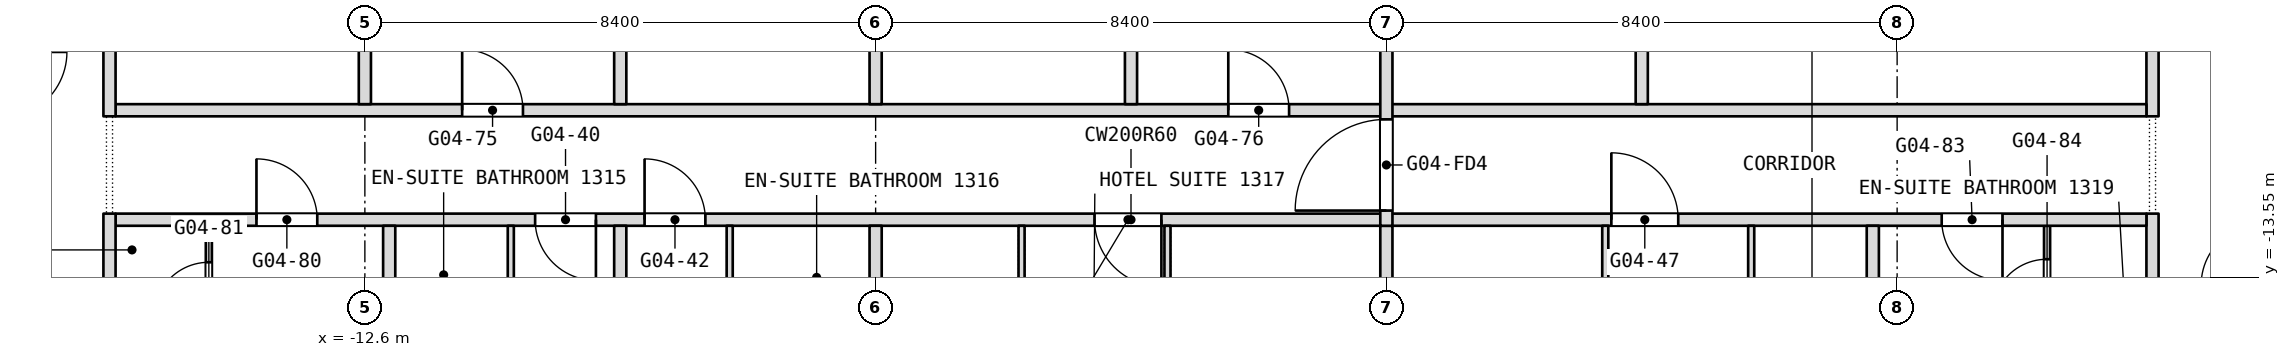
"""IFC4 building model, lengths in metres.
Left out: names, types, materials, properties, quantities, classifications, styles, units other than length and angle.
Written with IfcOpenShell. Run it as: python <this file> out.ifc"""

import sys

from ifc_helpers import new_model, si_unit, direction, frame, frame_2d, origin, place, context, subcontext, project, spatial, rectangle, extrude, element, fill, save


model = new_model("IFC4")
c1 = context("Model", 3, precision=1e-05, world=origin(), true_north=direction((0.0, 1.0)))
c2 = subcontext(c1, "Body", "Model", "MODEL_VIEW")
j1 = project(units=[si_unit("LENGTHUNIT", "METRE"), si_unit("PLANEANGLEUNIT", "RADIAN")], contexts=[c1])
p1 = place(None, origin())
s1 = spatial("IfcSite", under=j1, at=p1, CompositionType="ELEMENT")
p2 = place(p1, origin())
s2 = spatial("IfcBuilding", under=s1, at=p2, CompositionType="ELEMENT")
p3 = place(p2, frame((0.0, 0.0, 61.7)))
s3 = spatial("IfcBuildingStorey", under=s2, at=p3, CompositionType="ELEMENT", Elevation=61.7)
p4 = place(p3, frame((16.8, -17.143, 0.0), z_axis=(0.0, 0.0, 1.0), x_axis=(0.0, 1.0, 0.0)))
e1 = element("IfcWall", 1, at=p4, inside=s3, PredefinedType="PARTITIONING", context=c2, shape_type="SweptSolid", body=[
    extrude(rectangle(XDim=4.643, YDim=0.2, at=frame_2d((2.322, 0.0))), origin(), (0.0, 0.0, 1.0), 3.34),
])
p5 = place(p4, frame((0.771, 0.0, 0.0)))
e2 = element("IfcOpeningElement", 2, at=p5, cuts=e1, PredefinedType="OPENING", context=c2, shape_type="SweptSolid", body=[
    extrude(rectangle(XDim=0.9, YDim=2.1, at=frame_2d((0.45, 1.05))), frame((0.0, 0.1, 0.0), z_axis=(0.0, -1.0, 0.0), x_axis=(1.0, 0.0, 0.0)), (0.0, 0.0, 1.0), 0.2),
])
p6 = place(p3, frame((16.8, -10.9, 0.0), z_axis=(0.0, 0.0, 1.0), x_axis=(0.0, 1.0, 0.0)))
e3 = element("IfcWall", 3, at=p6, inside=s3, PredefinedType="PARTITIONING", context=c2, shape_type="SweptSolid", body=[
    extrude(rectangle(XDim=7.3, YDim=0.2, at=frame_2d((3.65, 0.0))), origin(), (0.0, 0.0, 1.0), 3.34),
])
p7 = place(p6, frame((3.15, 0.0, 0.0)))
e4 = element("IfcOpeningElement", 4, at=p7, cuts=e3, PredefinedType="OPENING", context=c2, shape_type="SweptSolid", body=[
    extrude(rectangle(XDim=1.0, YDim=2.1, at=frame_2d((0.5, 1.05))), frame((0.0, 0.1, 0.0), z_axis=(0.0, -1.0, 0.0), x_axis=(1.0, 0.0, 0.0)), (0.0, 0.0, 1.0), 0.2),
])
p8 = place(p3, frame((15.066, -14.9, 0.0), z_axis=(0.0, 0.0, 1.0), x_axis=(0.0, 1.0, 0.0)))
e5 = element("IfcWall", 5, at=p8, inside=s3, PredefinedType="PARTITIONING", context=c2, shape_type="SweptSolid", body=[
    extrude(rectangle(XDim=2.2, YDim=0.1, at=frame_2d((1.1, 0.0))), origin(), (0.0, 0.0, 1.0), 3.34),
])
p9 = place(p8, frame((0.75, 0.0, 0.0)))
e6 = element("IfcOpeningElement", 6, at=p9, cuts=e5, PredefinedType="OPENING", context=c2, shape_type="SweptSolid", body=[
    extrude(rectangle(XDim=0.9, YDim=2.1, at=frame_2d((0.45, 1.05))), frame((0.0, 0.05, 0.0), z_axis=(0.0, -1.0, 0.0), x_axis=(1.0, 0.0, 0.0)), (0.0, 0.0, 1.0), 0.1),
])
p10 = place(p3, frame((-16.7, -12.6, 0.0), z_axis=(0.0, 0.0, 1.0), x_axis=(1.0, 0.0, 0.0)))
e7 = element("IfcWall", 7, at=p10, inside=s3, PredefinedType="PARTITIONING", context=c2, shape_type="SweptSolid", body=[
    extrude(rectangle(XDim=33.4, YDim=0.2, at=frame_2d((16.7, 0.0))), origin(), (0.0, 0.0, 1.0), 3.34),
])
p11 = place(p10, frame((6.9, 0.0, 0.0)))
e8 = element("IfcOpeningElement", 8, at=p11, cuts=e7, PredefinedType="OPENING", context=c2, shape_type="SweptSolid", body=[
    extrude(rectangle(XDim=1.0, YDim=2.1, at=frame_2d((0.5, 1.05))), frame((0.0, 0.1, 0.0), z_axis=(0.0, -1.0, 0.0), x_axis=(1.0, 0.0, 0.0)), (0.0, 0.0, 1.0), 0.2),
])
p12 = place(p10, frame((8.7, 0.0, 0.0)))
e9 = element("IfcOpeningElement", 9, at=p12, cuts=e7, PredefinedType="OPENING", context=c2, shape_type="SweptSolid", body=[
    extrude(rectangle(XDim=1.0, YDim=2.1, at=frame_2d((0.5, 1.05))), frame((0.0, 0.1, 0.0), z_axis=(0.0, -1.0, 0.0), x_axis=(1.0, 0.0, 0.0)), (0.0, 0.0, 1.0), 0.2),
])
p13 = place(p10, frame((16.1, 0.0, 0.0)))
e10 = element("IfcOpeningElement", 10, at=p13, cuts=e7, PredefinedType="OPENING", context=c2, shape_type="SweptSolid", body=[
    extrude(rectangle(XDim=1.1, YDim=2.1, at=frame_2d((0.55, 1.05))), frame((0.0, 0.1, 0.0), z_axis=(0.0, -1.0, 0.0), x_axis=(1.0, 0.0, 0.0)), (0.0, 0.0, 1.0), 0.2),
])
p14 = place(p10, frame((24.6, 0.0, 0.0)))
e11 = element("IfcOpeningElement", 11, at=p14, cuts=e7, PredefinedType="OPENING", context=c2, shape_type="SweptSolid", body=[
    extrude(rectangle(XDim=1.1, YDim=2.1, at=frame_2d((0.55, 1.05))), frame((0.0, 0.1, 0.0), z_axis=(0.0, -1.0, 0.0), x_axis=(1.0, 0.0, 0.0)), (0.0, 0.0, 1.0), 0.2),
])
p15 = place(p10, frame((2.317, 0.0, 0.0)))
e12 = element("IfcOpeningElement", 12, at=p15, cuts=e7, PredefinedType="OPENING", context=c2, shape_type="SweptSolid", body=[
    extrude(rectangle(XDim=1.0, YDim=2.1, at=frame_2d((0.5, 1.05))), frame((0.0, 0.1, 0.0), z_axis=(0.0, -1.0, 0.0), x_axis=(1.0, 0.0, 0.0)), (0.0, 0.0, 1.0), 0.2),
])
p16 = place(p10, frame((30.033, 0.0, 0.0)))
e13 = element("IfcOpeningElement", 13, at=p16, cuts=e7, PredefinedType="OPENING", context=c2, shape_type="SweptSolid", body=[
    extrude(rectangle(XDim=1.0, YDim=2.1, at=frame_2d((0.5, 1.05))), frame((0.0, 0.1, 0.0), z_axis=(0.0, -1.0, 0.0), x_axis=(1.0, 0.0, 0.0)), (0.0, 0.0, 1.0), 0.2),
])
p17 = place(p3, frame((12.2, -15.8, 0.0), z_axis=(0.0, 0.0, 1.0), x_axis=(0.0, 1.0, 0.0)))
e14 = element("IfcWall", 14, at=p17, inside=s3, PredefinedType="PARTITIONING", context=c2, shape_type="SweptSolid", body=[
    extrude(rectangle(XDim=3.1, YDim=0.2, at=frame_2d((1.55, 0.0))), origin(), (0.0, 0.0, 1.0), 3.34),
])
p18 = place(p3, frame((-16.7, -10.8, 0.0), z_axis=(0.0, 0.0, 1.0), x_axis=(1.0, 0.0, 0.0)))
e15 = element("IfcWall", 15, at=p18, inside=s3, PredefinedType="PARTITIONING", context=c2, shape_type="SweptSolid", body=[
    extrude(rectangle(XDim=33.4, YDim=0.2, at=frame_2d((16.7, 0.0))), origin(), (0.0, 0.0, 1.0), 3.34),
])
p19 = place(p18, frame((5.7, 0.0, 0.0)))
e16 = element("IfcOpeningElement", 16, at=p19, cuts=e15, PredefinedType="OPENING", context=c2, shape_type="SweptSolid", body=[
    extrude(rectangle(XDim=1.0, YDim=2.1, at=frame_2d((0.5, 1.05))), frame((0.0, 0.1, 0.0), z_axis=(0.0, -1.0, 0.0), x_axis=(1.0, 0.0, 0.0)), (0.0, 0.0, 1.0), 0.2),
])
p20 = place(p18, frame((18.3, 0.0, 0.0)))
e17 = element("IfcOpeningElement", 17, at=p20, cuts=e15, PredefinedType="OPENING", context=c2, shape_type="SweptSolid", body=[
    extrude(rectangle(XDim=1.0, YDim=2.1, at=frame_2d((0.5, 1.05))), frame((0.0, 0.1, 0.0), z_axis=(0.0, -1.0, 0.0), x_axis=(1.0, 0.0, 0.0)), (0.0, 0.0, 1.0), 0.2),
])
p21 = place(p3, frame((10.2, -16.25, 0.0), z_axis=(0.0, 0.0, 1.0), x_axis=(0.0, 1.0, 0.0)))
e18 = element("IfcWall", 18, at=p21, inside=s3, PredefinedType="PARTITIONING", context=c2, shape_type="SweptSolid", body=[
    extrude(rectangle(XDim=3.55, YDim=0.1, at=frame_2d((1.775, 0.0))), origin(), (0.0, 0.0, 1.0), 3.34),
])
p22 = place(p3, frame((8.4, -10.7, 0.0), z_axis=(0.0, 0.0, 1.0), x_axis=(0.0, 1.0, 0.0)))
e19 = element("IfcWall", 19, at=p22, inside=s3, PredefinedType="PARTITIONING", context=c2, shape_type="SweptSolid", body=[
    extrude(rectangle(XDim=3.6, YDim=0.2, at=frame_2d((1.8, 0.0))), origin(), (0.0, 0.0, 1.0), 3.34),
])
p23 = place(p3, frame((7.8, -16.15, 0.0), z_axis=(0.0, 0.0, 1.0), x_axis=(0.0, 1.0, 0.0)))
e20 = element("IfcWall", 20, at=p23, inside=s3, PredefinedType="PARTITIONING", context=c2, shape_type="SweptSolid", body=[
    extrude(rectangle(XDim=3.45, YDim=0.1, at=frame_2d((1.725, 0.0))), origin(), (0.0, 0.0, 1.0), 3.34),
])
p24 = place(p3, frame((4.2, -17.7, 0.0), z_axis=(0.0, 0.0, 1.0), x_axis=(0.0, 1.0, 0.0)))
e21 = element("IfcWall", 21, at=p24, inside=s3, PredefinedType="PARTITIONING", context=c2, shape_type="SweptSolid", body=[
    extrude(rectangle(XDim=5.0, YDim=0.2, at=frame_2d((2.5, 0.0))), origin(), (0.0, 0.0, 1.0), 3.34),
])
p25 = place(p3, frame((4.2, -12.7, 0.0), z_axis=(0.0, 0.0, 1.0), x_axis=(0.0, 1.0, 0.0)))
e22 = element("IfcWall", 22, at=p25, inside=s3, PredefinedType="PARTITIONING", context=c2, shape_type="SweptSolid", body=[
    extrude(rectangle(XDim=12.7, YDim=0.2, at=frame_2d((6.35, 0.0))), origin(), (0.0, 0.0, 1.0), 3.34),
])
p26 = place(p25, frame((11.05, 0.0, 0.0)))
e23 = element("IfcOpeningElement", 23, at=p26, cuts=e22, PredefinedType="OPENING", context=c2, shape_type="SweptSolid", body=[
    extrude(rectangle(XDim=1.5, YDim=2.1, at=frame_2d((0.75, 1.05))), frame((0.0, 0.1, 0.0), z_axis=(0.0, -1.0, 0.0), x_axis=(1.0, 0.0, 0.0)), (0.0, 0.0, 1.0), 0.2),
])
p27 = place(p25, frame((0.25, 0.0, 0.0)))
e24 = element("IfcOpeningElement", 24, at=p27, cuts=e22, PredefinedType="OPENING", context=c2, shape_type="SweptSolid", body=[
    extrude(rectangle(XDim=1.5, YDim=2.1, at=frame_2d((0.75, 1.05))), frame((0.0, 0.1, 0.0), z_axis=(0.0, -1.0, 0.0), x_axis=(1.0, 0.0, 0.0)), (0.0, 0.0, 1.0), 0.2),
])
p28 = place(p3, frame((0.6, -16.25, 0.0), z_axis=(0.0, 0.0, 1.0), x_axis=(0.0, 1.0, 0.0)))
e25 = element("IfcWall", 25, at=p28, inside=s3, PredefinedType="PARTITIONING", context=c2, shape_type="SweptSolid", body=[
    extrude(rectangle(XDim=3.55, YDim=0.1, at=frame_2d((1.775, 0.0))), origin(), (0.0, 0.0, 1.0), 3.34),
])
p29 = place(p3, frame((0.0, -10.7, 0.0), z_axis=(0.0, 0.0, 1.0), x_axis=(0.0, 1.0, 0.0)))
e26 = element("IfcWall", 26, at=p29, inside=s3, PredefinedType="PARTITIONING", context=c2, shape_type="SweptSolid", body=[
    extrude(rectangle(XDim=8.8, YDim=0.2, at=frame_2d((4.4, 0.0))), origin(), (0.0, 0.0, 1.0), 3.34),
])
p30 = place(p3, frame((-1.8, -16.15, 0.0), z_axis=(0.0, 0.0, 1.0), x_axis=(0.0, 1.0, 0.0)))
e27 = element("IfcWall", 27, at=p30, inside=s3, PredefinedType="PARTITIONING", context=c2, shape_type="SweptSolid", body=[
    extrude(rectangle(XDim=3.45, YDim=0.1, at=frame_2d((1.725, 0.0))), origin(), (0.0, 0.0, 1.0), 3.34),
])
p31 = place(p3, frame((-4.2, -17.7, 0.0), z_axis=(0.0, 0.0, 1.0), x_axis=(0.0, 1.0, 0.0)))
e28 = element("IfcWall", 28, at=p31, inside=s3, PredefinedType="PARTITIONING", context=c2, shape_type="SweptSolid", body=[
    extrude(rectangle(XDim=5.0, YDim=0.2, at=frame_2d((2.5, 0.0))), origin(), (0.0, 0.0, 1.0), 3.34),
])
p32 = place(p3, frame((-4.2, -10.7, 0.0), z_axis=(0.0, 0.0, 1.0), x_axis=(0.0, 1.0, 0.0)))
e29 = element("IfcWall", 29, at=p32, inside=s3, PredefinedType="PARTITIONING", context=c2, shape_type="SweptSolid", body=[
    extrude(rectangle(XDim=8.8, YDim=0.2, at=frame_2d((4.4, 0.0))), origin(), (0.0, 0.0, 1.0), 3.34),
])
p33 = place(p3, frame((-6.6, -15.425, 0.0), z_axis=(0.0, 0.0, 1.0), x_axis=(0.0, 1.0, 0.0)))
e30 = element("IfcWall", 30, at=p33, inside=s3, PredefinedType="PARTITIONING", context=c2, shape_type="SweptSolid", body=[
    extrude(rectangle(XDim=2.725, YDim=0.1, at=frame_2d((1.363, 0.0))), origin(), (0.0, 0.0, 1.0), 3.34),
])
p34 = place(p3, frame((-8.4, -17.7, 0.0), z_axis=(0.0, 0.0, 1.0), x_axis=(0.0, 1.0, 0.0)))
e31 = element("IfcWall", 31, at=p34, inside=s3, PredefinedType="PARTITIONING", context=c2, shape_type="SweptSolid", body=[
    extrude(rectangle(XDim=5.0, YDim=0.2, at=frame_2d((2.5, 0.0))), origin(), (0.0, 0.0, 1.0), 3.34),
])
p35 = place(p3, frame((-8.4, -10.7, 0.0), z_axis=(0.0, 0.0, 1.0), x_axis=(0.0, 1.0, 0.0)))
e32 = element("IfcWall", 32, at=p35, inside=s3, PredefinedType="PARTITIONING", context=c2, shape_type="SweptSolid", body=[
    extrude(rectangle(XDim=5.4, YDim=0.2, at=frame_2d((2.7, 0.0))), origin(), (0.0, 0.0, 1.0), 3.34),
])
p36 = place(p3, frame((-10.2, -15.325, 0.0), z_axis=(0.0, 0.0, 1.0), x_axis=(0.0, 1.0, 0.0)))
e33 = element("IfcWall", 33, at=p36, inside=s3, PredefinedType="PARTITIONING", context=c2, shape_type="SweptSolid", body=[
    extrude(rectangle(XDim=2.625, YDim=0.1, at=frame_2d((1.312, 0.0))), origin(), (0.0, 0.0, 1.0), 3.34),
])
p37 = place(p3, frame((-12.2, -15.275, 0.0), z_axis=(0.0, 0.0, 1.0), x_axis=(0.0, 1.0, 0.0)))
e34 = element("IfcWall", 34, at=p37, inside=s3, PredefinedType="PARTITIONING", context=c2, shape_type="SweptSolid", body=[
    extrude(rectangle(XDim=2.575, YDim=0.2, at=frame_2d((1.288, 0.0))), origin(), (0.0, 0.0, 1.0), 3.34),
])
p38 = place(p3, frame((-12.6, -10.7, 0.0), z_axis=(0.0, 0.0, 1.0), x_axis=(0.0, 1.0, 0.0)))
e35 = element("IfcWall", 35, at=p38, inside=s3, PredefinedType="PARTITIONING", context=c2, shape_type="SweptSolid", body=[
    extrude(rectangle(XDim=5.4, YDim=0.2, at=frame_2d((2.7, 0.0))), origin(), (0.0, 0.0, 1.0), 3.34),
])
p39 = place(p3, frame((-15.166, -15.0, 0.0), z_axis=(0.0, 0.0, 1.0), x_axis=(0.0, 1.0, 0.0)))
e36 = element("IfcWall", 36, at=p39, inside=s3, PredefinedType="PARTITIONING", context=c2, shape_type="SweptSolid", body=[
    extrude(rectangle(XDim=2.3, YDim=0.1, at=frame_2d((1.15, 0.0))), origin(), (0.0, 0.0, 1.0), 3.34),
])
p40 = place(p39, frame((0.8, 0.0, 0.0)))
e37 = element("IfcOpeningElement", 37, at=p40, cuts=e36, PredefinedType="OPENING", context=c2, shape_type="SweptSolid", body=[
    extrude(rectangle(XDim=0.9, YDim=2.1, at=frame_2d((0.45, 1.05))), frame((0.0, 0.05, 0.0), z_axis=(0.0, -1.0, 0.0), x_axis=(1.0, 0.0, 0.0)), (0.0, 0.0, 1.0), 0.1),
])
p41 = place(p3, frame((-16.8, -17.143, 0.0), z_axis=(0.0, 0.0, 1.0), x_axis=(0.0, 1.0, 0.0)))
e38 = element("IfcWall", 38, at=p41, inside=s3, PredefinedType="PARTITIONING", context=c2, shape_type="SweptSolid", body=[
    extrude(rectangle(XDim=4.643, YDim=0.2, at=frame_2d((2.322, 0.0))), origin(), (0.0, 0.0, 1.0), 3.34),
])
p42 = place(p41, frame((0.772, 0.0, 0.0)))
e39 = element("IfcOpeningElement", 39, at=p42, cuts=e38, PredefinedType="OPENING", context=c2, shape_type="SweptSolid", body=[
    extrude(rectangle(XDim=0.9, YDim=2.1, at=frame_2d((0.45, 1.05))), frame((0.0, 0.1, 0.0), z_axis=(0.0, -1.0, 0.0), x_axis=(1.0, 0.0, 0.0)), (0.0, 0.0, 1.0), 0.2),
])
p43 = place(p3, frame((-16.8, -10.9, 0.0), z_axis=(0.0, 0.0, 1.0), x_axis=(0.0, 1.0, 0.0)))
e40 = element("IfcWall", 40, at=p43, inside=s3, PredefinedType="PARTITIONING", context=c2, shape_type="SweptSolid", body=[
    extrude(rectangle(XDim=9.0, YDim=0.2, at=frame_2d((4.5, 0.0))), origin(), (0.0, 0.0, 1.0), 3.34),
])
p44 = place(p9, origin())
e41 = element("IfcDoor", 41, at=p44, inside=s3, OperationType="SINGLE_SWING_RIGHT", PredefinedType="DOOR", context=c2, shape_type="SweptSolid", body=[
    extrude(rectangle(XDim=0.9, YDim=2.1, at=frame_2d((0.45, 1.05))), frame((0.0, 0.025, 0.0), z_axis=(0.0, -1.0, 0.0), x_axis=(1.0, 0.0, 0.0)), (0.0, 0.0, 1.0), 0.05),
])
fill(e6, e41)
p45 = place(p11, origin())
e42 = element("IfcDoor", 42, at=p45, inside=s3, OperationType="SINGLE_SWING_RIGHT", PredefinedType="DOOR", context=c2, shape_type="SweptSolid", body=[
    extrude(rectangle(XDim=1.0, YDim=2.1, at=frame_2d((0.5, 1.05))), frame((0.0, 0.025, 0.0), z_axis=(0.0, -1.0, 0.0), x_axis=(1.0, 0.0, 0.0)), (0.0, 0.0, 1.0), 0.05),
])
fill(e8, e42)
p46 = place(p12, origin())
e43 = element("IfcDoor", 43, at=p46, inside=s3, OperationType="SINGLE_SWING_RIGHT", PredefinedType="DOOR", context=c2, shape_type="SweptSolid", body=[
    extrude(rectangle(XDim=1.0, YDim=2.1, at=frame_2d((0.5, 1.05))), frame((0.0, 0.025, 0.0), z_axis=(0.0, -1.0, 0.0), x_axis=(1.0, 0.0, 0.0)), (0.0, 0.0, 1.0), 0.05),
])
fill(e9, e43)
p47 = place(p13, origin())
e44 = element("IfcDoor", 44, at=p47, inside=s3, OperationType="SINGLE_SWING_LEFT", PredefinedType="DOOR", context=c2, shape_type="SweptSolid", body=[
    extrude(rectangle(XDim=1.1, YDim=2.1, at=frame_2d((0.55, 1.05))), frame((0.0, 0.025, 0.0), z_axis=(0.0, -1.0, 0.0), x_axis=(1.0, 0.0, 0.0)), (0.0, 0.0, 1.0), 0.05),
])
fill(e10, e44)
p48 = place(p14, origin())
e45 = element("IfcDoor", 45, at=p48, inside=s3, OperationType="SINGLE_SWING_RIGHT", PredefinedType="DOOR", context=c2, shape_type="SweptSolid", body=[
    extrude(rectangle(XDim=1.1, YDim=2.1, at=frame_2d((0.55, 1.05))), frame((0.0, 0.025, 0.0), z_axis=(0.0, -1.0, 0.0), x_axis=(1.0, 0.0, 0.0)), (0.0, 0.0, 1.0), 0.05),
])
fill(e11, e45)
p49 = place(p15, origin())
e46 = element("IfcDoor", 46, at=p49, inside=s3, OperationType="SINGLE_SWING_RIGHT", PredefinedType="DOOR", context=c2, shape_type="SweptSolid", body=[
    extrude(rectangle(XDim=1.0, YDim=2.1, at=frame_2d((0.5, 1.05))), frame((0.0, 0.025, 0.0), z_axis=(0.0, -1.0, 0.0), x_axis=(1.0, 0.0, 0.0)), (0.0, 0.0, 1.0), 0.05),
])
fill(e12, e46)
p50 = place(p16, origin())
e47 = element("IfcDoor", 47, at=p50, inside=s3, OperationType="SINGLE_SWING_LEFT", PredefinedType="DOOR", context=c2, shape_type="SweptSolid", body=[
    extrude(rectangle(XDim=1.0, YDim=2.1, at=frame_2d((0.5, 1.05))), frame((0.0, 0.025, 0.0), z_axis=(0.0, -1.0, 0.0), x_axis=(1.0, 0.0, 0.0)), (0.0, 0.0, 1.0), 0.05),
])
fill(e13, e47)
p51 = place(p19, origin())
e48 = element("IfcDoor", 48, at=p51, inside=s3, OperationType="SINGLE_SWING_LEFT", PredefinedType="DOOR", context=c2, shape_type="SweptSolid", body=[
    extrude(rectangle(XDim=1.0, YDim=2.1, at=frame_2d((0.5, 1.05))), frame((0.0, 0.025, 0.0), z_axis=(0.0, -1.0, 0.0), x_axis=(1.0, 0.0, 0.0)), (0.0, 0.0, 1.0), 0.05),
])
fill(e16, e48)
p52 = place(p20, origin())
e49 = element("IfcDoor", 49, at=p52, inside=s3, OperationType="SINGLE_SWING_RIGHT", PredefinedType="DOOR", context=c2, shape_type="SweptSolid", body=[
    extrude(rectangle(XDim=1.0, YDim=2.1, at=frame_2d((0.5, 1.05))), frame((0.0, 0.025, 0.0), z_axis=(0.0, -1.0, 0.0), x_axis=(1.0, 0.0, 0.0)), (0.0, 0.0, 1.0), 0.05),
])
fill(e17, e49)
p53 = place(p40, origin())
e50 = element("IfcDoor", 50, at=p53, inside=s3, OperationType="SINGLE_SWING_RIGHT", PredefinedType="DOOR", context=c2, shape_type="SweptSolid", body=[
    extrude(rectangle(XDim=0.9, YDim=2.1, at=frame_2d((0.45, 1.05))), frame((0.0, 0.025, 0.0), z_axis=(0.0, -1.0, 0.0), x_axis=(1.0, 0.0, 0.0)), (0.0, 0.0, 1.0), 0.05),
])
fill(e37, e50)
p54 = place(p27, origin())
e51 = element("IfcDoor", 51, at=p54, inside=s3, OperationType="DOUBLE_DOOR_DOUBLE_SWING", PredefinedType="DOOR", context=c2, shape_type="SweptSolid", body=[
    extrude(rectangle(XDim=1.5, YDim=2.1, at=frame_2d((0.75, 1.05))), frame((0.0, 0.025, 0.0), z_axis=(0.0, -1.0, 0.0), x_axis=(1.0, 0.0, 0.0)), (0.0, 0.0, 1.0), 0.05),
])
fill(e24, e51)
save(model, sys.argv[1])
